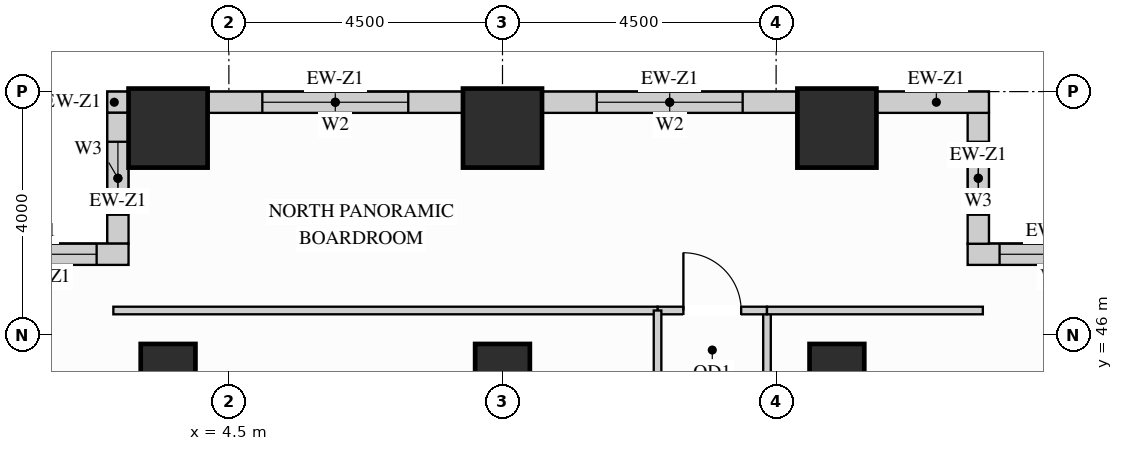
"""IFC4 building model, lengths in metres.
Left out: names, types, materials, properties, quantities, classifications, styles, units other than length and angle.
Written with IfcOpenShell. Run it as: python <this file> out.ifc"""

import sys

from ifc_helpers import new_model, si_unit, direction, frame, frame_2d, origin, origin_2d, place, context, subcontext, project, spatial, rectangle, extrude, source, transform, mapped, element, fill, save


model = new_model("IFC4")
c1 = context("Model", 3, precision=1e-05, world=origin(), true_north=direction((0.0, 1.0)))
c2 = subcontext(c1, "Body", "Model", "MODEL_VIEW")
j1 = project(units=[si_unit("LENGTHUNIT", "METRE"), si_unit("PLANEANGLEUNIT", "RADIAN")], contexts=[c1])
p1 = place(None, origin())
s1 = spatial("IfcSite", under=j1, at=p1, CompositionType="ELEMENT")
p2 = place(p1, origin())
s2 = spatial("IfcBuilding", under=s1, at=p2, CompositionType="ELEMENT")
p3 = place(p2, frame((0.0, 0.0, 40.5)))
s3 = spatial("IfcBuildingStorey", under=s2, at=p3, CompositionType="ELEMENT", Elevation=40.5)
m1 = source(origin(), c2, "Body", "SweptSolid", [
    extrude(rectangle(XDim=0.9, YDim=0.9, at=origin_2d()), origin(), (0.0, 0.0, 1.0), 3.38),
])
for number, where, z_axis, x_axis in (
    (1, (14.5, 45.4, 0.0), (0.0, 0.0, 1.0), (1.0, 0.0, 0.0)),
    (2, (3.5, 45.4, 0.0), (0.0, 0.0, 1.0), (1.0, 0.0, 0.0)),
    (3, (9.0, 45.4, 0.0), (0.0, 0.0, 1.0), (1.0, 0.0, 0.0)),
):
    element("IfcColumn", number, at=place(p3, frame(where, z_axis=z_axis, x_axis=x_axis)), inside=s3, PredefinedType="COLUMN", context=c2, shape_type="MappedRepresentation", body=[
        mapped(m1, transform((0.0, 0.0, 0.0), x_axis=(1.0, 0.0, 0.0), y_axis=(0.0, 1.0, 0.0), z_axis=(0.0, 0.0, 1.0))),
    ])
m2 = source(origin(), c2, "Body", "SweptSolid", [
    extrude(rectangle(XDim=1.3, YDim=1.3, at=origin_2d()), origin(), (0.0, 0.0, 1.0), 3.38),
])
for number, where, z_axis, x_axis in (
    (4, (14.5, 49.4, 0.0), (0.0, 0.0, 1.0), (1.0, 0.0, 0.0)),
    (5, (3.5, 49.4, 0.0), (0.0, 0.0, 1.0), (1.0, 0.0, 0.0)),
    (6, (9.0, 49.4, 0.0), (0.0, 0.0, 1.0), (1.0, 0.0, 0.0)),
):
    element("IfcColumn", number, at=place(p3, frame(where, z_axis=z_axis, x_axis=x_axis)), inside=s3, PredefinedType="COLUMN", context=c2, shape_type="MappedRepresentation", body=[
        mapped(m2, transform((0.0, 0.0, 0.0), x_axis=(1.0, 0.0, 0.0), y_axis=(0.0, 1.0, 0.0), z_axis=(0.0, 0.0, 1.0))),
    ])
p4 = place(p3, frame((19.5, 47.325, 0.0), z_axis=(0.0, 0.0, 1.0), x_axis=(-1.0, 0.0, 0.0)))
e7 = element("IfcWall", 7, at=p4, inside=s3, PredefinedType="SOLIDWALL", context=c2, shape_type="SweptSolid", body=[
    extrude(rectangle(XDim=2.85, YDim=0.35, at=frame_2d((1.425, 0.0))), origin(), (0.0, 0.0, 1.0), 3.365),
])
p5 = place(p4, frame((0.525, 0.0, 0.78)))
e8 = element("IfcOpeningElement", 8, at=p5, cuts=e7, PredefinedType="OPENING", context=c2, shape_type="SweptSolid", body=[
    extrude(rectangle(XDim=1.8, YDim=2.1, at=frame_2d((0.9, 1.05))), frame((0.0, 0.185, 0.0), z_axis=(0.0, -1.0, 0.0), x_axis=(1.0, 0.0, 0.0)), (0.0, 0.0, 1.0), 0.37),
])
p6 = place(p3, frame((16.825, 47.498, 0.0), z_axis=(0.0, 0.0, 1.0), x_axis=(0.0, 1.0, 0.0)))
e9 = element("IfcWall", 9, at=p6, inside=s3, PredefinedType="SOLIDWALL", context=c2, shape_type="SweptSolid", body=[
    extrude(rectangle(XDim=2.154, YDim=0.35, at=frame_2d((1.077, 0.0))), origin(), (0.0, 0.0, 1.0), 3.365),
])
p7 = place(p6, frame((0.477, 0.0, 0.78)))
e10 = element("IfcOpeningElement", 10, at=p7, cuts=e9, PredefinedType="OPENING", context=c2, shape_type="SweptSolid", body=[
    extrude(rectangle(XDim=1.2, YDim=2.1, at=frame_2d((0.6, 1.05))), frame((0.0, 0.185, 0.0), z_axis=(0.0, -1.0, 0.0), x_axis=(1.0, 0.0, 0.0)), (0.0, 0.0, 1.0), 0.37),
])
m3 = source(origin(), c2, "Body", "SweptSolid", [
    extrude(rectangle(XDim=1.852, YDim=0.35, at=frame_2d((0.926, 0.0))), origin(), (0.0, 0.0, 1.0), 3.365),
])
p8 = place(p3, frame((17.0, 49.825, 0.0), z_axis=(0.0, 0.0, 1.0), x_axis=(-1.0, 0.0, 0.0)))
e11 = element("IfcWall", 11, at=p8, inside=s3, PredefinedType="SOLIDWALL", context=c2, shape_type="MappedRepresentation", body=[
    mapped(m3, transform((0.0, 0.0, 0.0), x_axis=(1.0, 0.0, 0.0), y_axis=(0.0, 1.0, 0.0), z_axis=(0.0, 0.0, 1.0))),
])
p9 = place(p3, frame((13.852, 49.825, 0.0), z_axis=(0.0, 0.0, 1.0), x_axis=(-1.0, 0.0, 0.0)))
e12 = element("IfcWall", 12, at=p9, inside=s3, PredefinedType="SOLIDWALL", context=c2, shape_type="SweptSolid", body=[
    extrude(rectangle(XDim=4.204, YDim=0.35, at=frame_2d((2.102, 0.0))), origin(), (0.0, 0.0, 1.0), 2.51),
])
p10 = place(p9, frame((0.902, 0.0, 0.78)))
e13 = element("IfcOpeningElement", 13, at=p10, cuts=e12, PredefinedType="OPENING", context=c2, shape_type="SweptSolid", body=[
    extrude(rectangle(XDim=2.4, YDim=1.55, at=frame_2d((1.2, 0.775))), frame((0.0, 0.185, 0.0), z_axis=(0.0, -1.0, 0.0), x_axis=(1.0, 0.0, 0.0)), (0.0, 0.0, 1.0), 0.37),
])
p11 = place(p3, frame((8.352, 49.825, 0.0), z_axis=(0.0, 0.0, 1.0), x_axis=(-1.0, 0.0, 0.0)))
e14 = element("IfcWall", 14, at=p11, inside=s3, PredefinedType="SOLIDWALL", context=c2, shape_type="SweptSolid", body=[
    extrude(rectangle(XDim=4.204, YDim=0.35, at=frame_2d((2.102, 0.0))), origin(), (0.0, 0.0, 1.0), 2.51),
])
p12 = place(p11, frame((0.902, 0.0, 0.78)))
e15 = element("IfcOpeningElement", 15, at=p12, cuts=e14, PredefinedType="OPENING", context=c2, shape_type="SweptSolid", body=[
    extrude(rectangle(XDim=2.4, YDim=1.55, at=frame_2d((1.2, 0.775))), frame((0.0, 0.185, 0.0), z_axis=(0.0, -1.0, 0.0), x_axis=(1.0, 0.0, 0.0)), (0.0, 0.0, 1.0), 0.37),
])
m4 = source(origin(), c2, "Body", "SweptSolid", [
    extrude(rectangle(XDim=0.352, YDim=0.35, at=frame_2d((0.176, 0.0))), origin(), (0.0, 0.0, 1.0), 3.365),
])
p13 = place(p3, frame((2.852, 49.825, 0.0), z_axis=(0.0, 0.0, 1.0), x_axis=(-1.0, 0.0, 0.0)))
e16 = element("IfcWall", 16, at=p13, inside=s3, PredefinedType="SOLIDWALL", context=c2, shape_type="MappedRepresentation", body=[
    mapped(m4, transform((0.0, 0.0, 0.0), x_axis=(1.0, 0.0, 0.0), y_axis=(0.0, 1.0, 0.0), z_axis=(0.0, 0.0, 1.0))),
])
p14 = place(p3, frame((2.675, 49.652, 0.0), z_axis=(0.0, 0.0, 1.0), x_axis=(0.0, -1.0, 0.0)))
e17 = element("IfcWall", 17, at=p14, inside=s3, PredefinedType="SOLIDWALL", context=c2, shape_type="SweptSolid", body=[
    extrude(rectangle(XDim=2.154, YDim=0.35, at=frame_2d((1.077, 0.0))), origin(), (0.0, 0.0, 1.0), 3.365),
])
p15 = place(p14, frame((0.477, 0.0, 0.78)))
e18 = element("IfcOpeningElement", 18, at=p15, cuts=e17, PredefinedType="OPENING", context=c2, shape_type="SweptSolid", body=[
    extrude(rectangle(XDim=1.2, YDim=2.1, at=frame_2d((0.6, 1.05))), frame((0.0, 0.185, 0.0), z_axis=(0.0, -1.0, 0.0), x_axis=(1.0, 0.0, 0.0)), (0.0, 0.0, 1.0), 0.37),
])
p16 = place(p3, frame((2.85, 47.325, 0.0), z_axis=(0.0, 0.0, 1.0), x_axis=(-1.0, 0.0, 0.0)))
e19 = element("IfcWall", 19, at=p16, inside=s3, PredefinedType="SOLIDWALL", context=c2, shape_type="SweptSolid", body=[
    extrude(rectangle(XDim=2.85, YDim=0.35, at=frame_2d((1.425, 0.0))), origin(), (0.0, 0.0, 1.0), 3.365),
])
p17 = place(p16, frame((0.525, 0.0, 0.78)))
e20 = element("IfcOpeningElement", 20, at=p17, cuts=e19, PredefinedType="OPENING", context=c2, shape_type="SweptSolid", body=[
    extrude(rectangle(XDim=1.8, YDim=2.1, at=frame_2d((0.9, 1.05))), frame((0.0, 0.185, 0.0), z_axis=(0.0, -1.0, 0.0), x_axis=(1.0, 0.0, 0.0)), (0.0, 0.0, 1.0), 0.37),
])
p18 = place(p3, frame((13.35, 31.65, 0.0), z_axis=(0.0, 0.0, 1.0), x_axis=(0.0, 1.0, 0.0)))
e21 = element("IfcWall", 21, at=p18, inside=s3, PredefinedType="PARTITIONING", context=c2, shape_type="SweptSolid", body=[
    extrude(rectangle(XDim=14.75, YDim=0.125, at=frame_2d((7.375, 0.0))), origin(), (0.0, 0.0, 1.0), 3.365),
])
p19 = place(p18, frame((7.402, 0.0, 0.0)))
e22 = element("IfcOpeningElement", 22, at=p19, cuts=e21, PredefinedType="OPENING", context=c2, shape_type="SweptSolid", body=[
    extrude(rectangle(XDim=0.95, YDim=2.15, at=frame_2d((0.475, 1.075))), frame((0.0, 0.073, 0.0), z_axis=(0.0, -1.0, 0.0), x_axis=(1.0, 0.0, 0.0)), (0.0, 0.0, 1.0), 0.145),
])
p20 = place(p3, frame((11.55, 46.4, 0.0), z_axis=(0.0, 0.0, 1.0), x_axis=(1.0, 0.0, 0.0)))
e23 = element("IfcWall", 23, at=p20, inside=s3, PredefinedType="PARTITIONING", context=c2, shape_type="SweptSolid", body=[
    extrude(rectangle(XDim=1.8, YDim=0.125, at=frame_2d((0.9, 0.0))), origin(), (0.0, 0.0, 1.0), 3.365),
])
p21 = place(p20, frame((0.425, 0.0, 0.0)))
e24 = element("IfcOpeningElement", 24, at=p21, cuts=e23, PredefinedType="OPENING", context=c2, shape_type="SweptSolid", body=[
    extrude(rectangle(XDim=0.95, YDim=2.15, at=frame_2d((0.475, 1.075))), frame((0.0, 0.073, 0.0), z_axis=(0.0, -1.0, 0.0), x_axis=(1.0, 0.0, 0.0)), (0.0, 0.0, 1.0), 0.145),
])
m5 = source(origin(), c2, "Body", "SweptSolid", [
    extrude(rectangle(XDim=3.55, YDim=0.125, at=frame_2d((1.775, 0.0))), origin(), (0.0, 0.0, 1.0), 3.365),
])
p22 = place(p3, frame((13.35, 46.4, 0.0), z_axis=(0.0, 0.0, 1.0), x_axis=(1.0, 0.0, 0.0)))
e25 = element("IfcWall", 25, at=p22, inside=s3, PredefinedType="PARTITIONING", context=c2, shape_type="MappedRepresentation", body=[
    mapped(m5, transform((0.0, 0.0, 0.0), x_axis=(1.0, 0.0, 0.0), y_axis=(0.0, 1.0, 0.0), z_axis=(0.0, 0.0, 1.0))),
])
m6 = source(origin(), c2, "Body", "SweptSolid", [
    extrude(rectangle(XDim=8.95, YDim=0.125, at=frame_2d((4.475, 0.0))), origin(), (0.0, 0.0, 1.0), 3.365),
])
p23 = place(p3, frame((2.6, 46.4, 0.0), z_axis=(0.0, 0.0, 1.0), x_axis=(1.0, 0.0, 0.0)))
e26 = element("IfcWall", 26, at=p23, inside=s3, PredefinedType="PARTITIONING", context=c2, shape_type="MappedRepresentation", body=[
    mapped(m6, transform((0.0, 0.0, 0.0), x_axis=(1.0, 0.0, 0.0), y_axis=(0.0, 1.0, 0.0), z_axis=(0.0, 0.0, 1.0))),
])
p24 = place(p3, frame((11.55, 39.615, 0.0), z_axis=(0.0, 0.0, 1.0), x_axis=(0.0, 1.0, 0.0)))
e27 = element("IfcWall", 27, at=p24, inside=s3, PredefinedType="PARTITIONING", context=c2, shape_type="SweptSolid", body=[
    extrude(rectangle(XDim=6.785, YDim=0.125, at=frame_2d((3.393, 0.0))), origin(), (0.0, 0.0, 1.0), 3.365),
])
p25 = place(p24, frame((2.917, 0.0, 0.0)))
e28 = element("IfcOpeningElement", 28, at=p25, cuts=e27, PredefinedType="OPENING", context=c2, shape_type="SweptSolid", body=[
    extrude(rectangle(XDim=0.95, YDim=2.15, at=frame_2d((0.475, 1.075))), frame((0.0, 0.073, 0.0), z_axis=(0.0, -1.0, 0.0), x_axis=(1.0, 0.0, 0.0)), (0.0, 0.0, 1.0), 0.145),
])
m7 = source(origin(), c2, "Body", "SweptSolid", [
    extrude(rectangle(XDim=0.95, YDim=2.15, at=frame_2d((0.475, 1.075))), frame((0.0, 0.025, 0.0), z_axis=(0.0, -1.0, 0.0), x_axis=(1.0, 0.0, 0.0)), (0.0, 0.0, 1.0), 0.05),
])
p26 = place(p21, origin())
e29 = element("IfcDoor", 29, at=p26, inside=s3, OperationType="SINGLE_SWING_LEFT", PredefinedType="DOOR", context=c2, shape_type="MappedRepresentation", body=[
    mapped(m7, transform((0.0, 0.0, 0.0), x_axis=(1.0, 0.0, 0.0), y_axis=(0.0, 1.0, 0.0), z_axis=(0.0, 0.0, 1.0))),
])
fill(e24, e29)
m8 = source(origin(), c2, "Body", "SweptSolid", [
    extrude(rectangle(XDim=1.8, YDim=2.1, at=frame_2d((0.9, 1.05))), frame((0.0, 0.03, 0.0), z_axis=(0.0, -1.0, 0.0), x_axis=(1.0, 0.0, 0.0)), (0.0, 0.0, 1.0), 0.06),
])
p27 = place(p5, origin())
e30 = element("IfcWindow", 30, at=p27, inside=s3, PartitioningType="SINGLE_PANEL", PredefinedType="WINDOW", context=c2, shape_type="MappedRepresentation", body=[
    mapped(m8, transform((0.0, 0.0, 0.0), x_axis=(1.0, 0.0, 0.0), y_axis=(0.0, 1.0, 0.0), z_axis=(0.0, 0.0, 1.0))),
])
fill(e8, e30)
p28 = place(p17, origin())
e31 = element("IfcWindow", 31, at=p28, inside=s3, PartitioningType="SINGLE_PANEL", PredefinedType="WINDOW", context=c2, shape_type="MappedRepresentation", body=[
    mapped(m8, transform((0.0, 0.0, 0.0), x_axis=(1.0, 0.0, 0.0), y_axis=(0.0, 1.0, 0.0), z_axis=(0.0, 0.0, 1.0))),
])
fill(e20, e31)
m9 = source(origin(), c2, "Body", "SweptSolid", [
    extrude(rectangle(XDim=2.4, YDim=1.55, at=frame_2d((1.2, 0.775))), frame((0.0, 0.03, 0.0), z_axis=(0.0, -1.0, 0.0), x_axis=(1.0, 0.0, 0.0)), (0.0, 0.0, 1.0), 0.06),
])
p29 = place(p10, origin())
e32 = element("IfcWindow", 32, at=p29, inside=s3, PartitioningType="SINGLE_PANEL", PredefinedType="WINDOW", context=c2, shape_type="MappedRepresentation", body=[
    mapped(m9, transform((0.0, 0.0, 0.0), x_axis=(1.0, 0.0, 0.0), y_axis=(0.0, 1.0, 0.0), z_axis=(0.0, 0.0, 1.0))),
])
fill(e13, e32)
p30 = place(p12, origin())
e33 = element("IfcWindow", 33, at=p30, inside=s3, PartitioningType="SINGLE_PANEL", PredefinedType="WINDOW", context=c2, shape_type="MappedRepresentation", body=[
    mapped(m9, transform((0.0, 0.0, 0.0), x_axis=(1.0, 0.0, 0.0), y_axis=(0.0, 1.0, 0.0), z_axis=(0.0, 0.0, 1.0))),
])
fill(e15, e33)
m10 = source(origin(), c2, "Body", "SweptSolid", [
    extrude(rectangle(XDim=1.2, YDim=2.1, at=frame_2d((0.6, 1.05))), frame((0.0, 0.03, 0.0), z_axis=(0.0, -1.0, 0.0), x_axis=(1.0, 0.0, 0.0)), (0.0, 0.0, 1.0), 0.06),
])
p31 = place(p7, origin())
e34 = element("IfcWindow", 34, at=p31, inside=s3, PartitioningType="SINGLE_PANEL", PredefinedType="WINDOW", context=c2, shape_type="MappedRepresentation", body=[
    mapped(m10, transform((0.0, 0.0, 0.0), x_axis=(1.0, 0.0, 0.0), y_axis=(0.0, 1.0, 0.0), z_axis=(0.0, 0.0, 1.0))),
])
fill(e10, e34)
p32 = place(p15, origin())
e35 = element("IfcWindow", 35, at=p32, inside=s3, PartitioningType="SINGLE_PANEL", PredefinedType="WINDOW", context=c2, shape_type="MappedRepresentation", body=[
    mapped(m10, transform((0.0, 0.0, 0.0), x_axis=(1.0, 0.0, 0.0), y_axis=(0.0, 1.0, 0.0), z_axis=(0.0, 0.0, 1.0))),
])
fill(e18, e35)
save(model, sys.argv[1])
